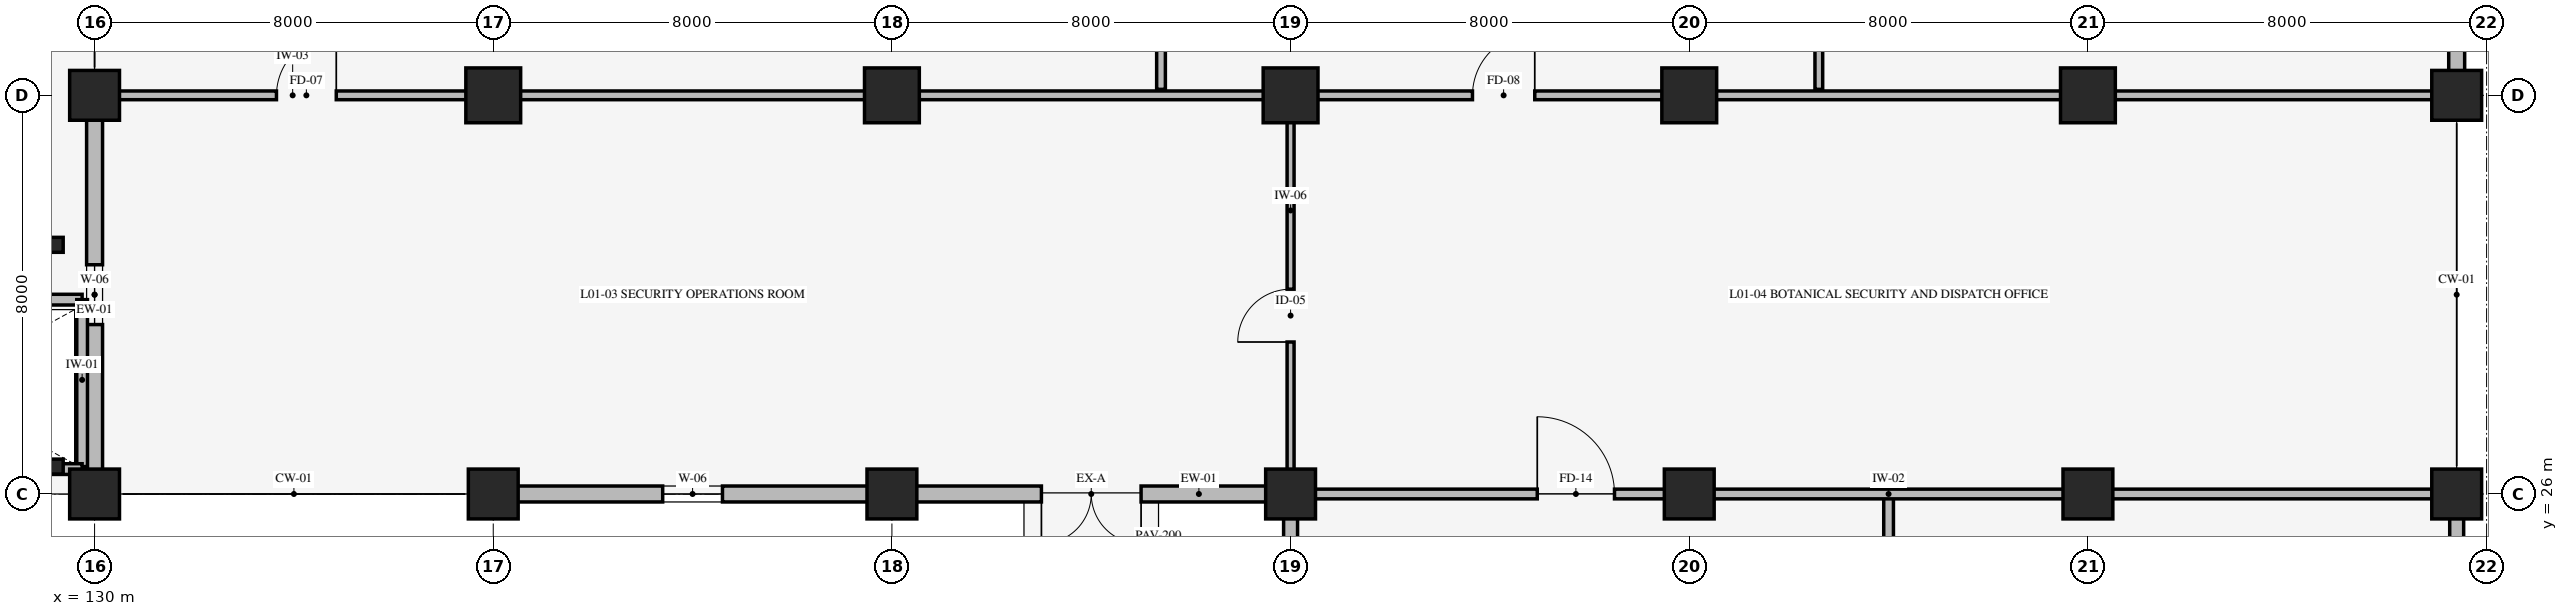
"""IFC4 building model, lengths in metres.
Left out: names, types, materials, properties, quantities, classifications, styles, units other than length and angle.
Written with IfcOpenShell. Run it as: python <this file> out.ifc"""

import sys

from ifc_helpers import new_model, si_unit, direction, frame, frame_2d, origin, origin_2d, place, context, subcontext, project, spatial, rectangle, hollow_rectangle, extrude, element, fill, save


model = new_model("IFC4")
c1 = context("Model", 3, precision=1e-05, world=origin(), true_north=direction((0.0, 1.0)))
c2 = subcontext(c1, "Body", "Model", "MODEL_VIEW")
j1 = project(units=[si_unit("LENGTHUNIT", "METRE"), si_unit("PLANEANGLEUNIT", "RADIAN")], contexts=[c1])
p1 = place(None, origin())
s1 = spatial("IfcSite", under=j1, at=p1, CompositionType="ELEMENT")
p2 = place(p1, origin())
s2 = spatial("IfcBuilding", under=s1, at=p2, CompositionType="ELEMENT")
p3 = place(p2, origin())
s3 = spatial("IfcBuildingStorey", under=s2, at=p3, CompositionType="ELEMENT", Elevation=0.0)
for number, where, z_axis, x_axis in (
    (1, (130.0, 26.0, 0.0), (0.0, 0.0, 1.0), (1.0, 0.0, 0.0)),
    (2, (130.0, 34.0, 0.0), (0.0, 0.0, 1.0), (1.0, 0.0, 0.0)),
    (3, (138.0, 26.0, 0.0), (0.0, 0.0, 1.0), (1.0, 0.0, 0.0)),
):
    element("IfcColumn", number, at=place(p3, frame(where, z_axis=z_axis, x_axis=x_axis)), inside=s3, PredefinedType="COLUMN", context=c2, shape_type="SweptSolid", body=[
        extrude(rectangle(XDim=1.0, YDim=1.0, at=origin_2d()), origin(), (0.0, 0.0, 1.0), 5.4),
    ])
p4 = place(p3, frame((138.0, 34.0, 0.0), z_axis=(0.0, 0.0, 1.0), x_axis=(1.0, 0.0, 0.0)))
e4 = element("IfcColumn", 4, at=p4, inside=s3, PredefinedType="COLUMN", context=c2, shape_type="SweptSolid", body=[
    extrude(rectangle(XDim=1.1, YDim=1.1, at=origin_2d()), origin(), (0.0, 0.0, 1.0), 5.4),
])
p5 = place(p3, frame((146.0, 26.0, 0.0), z_axis=(0.0, 0.0, 1.0), x_axis=(1.0, 0.0, 0.0)))
e5 = element("IfcColumn", 5, at=p5, inside=s3, PredefinedType="COLUMN", context=c2, shape_type="SweptSolid", body=[
    extrude(rectangle(XDim=1.0, YDim=1.0, at=origin_2d()), origin(), (0.0, 0.0, 1.0), 5.4),
])
p6 = place(p3, frame((146.0, 34.0, 0.0), z_axis=(0.0, 0.0, 1.0), x_axis=(1.0, 0.0, 0.0)))
e6 = element("IfcColumn", 6, at=p6, inside=s3, PredefinedType="COLUMN", context=c2, shape_type="SweptSolid", body=[
    extrude(rectangle(XDim=1.1, YDim=1.1, at=origin_2d()), origin(), (0.0, 0.0, 1.0), 5.4),
])
p7 = place(p3, frame((154.0, 26.0, 0.0), z_axis=(0.0, 0.0, 1.0), x_axis=(1.0, 0.0, 0.0)))
e7 = element("IfcColumn", 7, at=p7, inside=s3, PredefinedType="COLUMN", context=c2, shape_type="SweptSolid", body=[
    extrude(rectangle(XDim=1.0, YDim=1.0, at=origin_2d()), origin(), (0.0, 0.0, 1.0), 5.4),
])
p8 = place(p3, frame((154.0, 34.0, 0.0), z_axis=(0.0, 0.0, 1.0), x_axis=(1.0, 0.0, 0.0)))
e8 = element("IfcColumn", 8, at=p8, inside=s3, PredefinedType="COLUMN", context=c2, shape_type="SweptSolid", body=[
    extrude(rectangle(XDim=1.1, YDim=1.1, at=origin_2d()), origin(), (0.0, 0.0, 1.0), 5.4),
])
p9 = place(p3, frame((162.0, 26.0, 0.0), z_axis=(0.0, 0.0, 1.0), x_axis=(1.0, 0.0, 0.0)))
e9 = element("IfcColumn", 9, at=p9, inside=s3, PredefinedType="COLUMN", context=c2, shape_type="SweptSolid", body=[
    extrude(rectangle(XDim=1.0, YDim=1.0, at=origin_2d()), origin(), (0.0, 0.0, 1.0), 5.4),
])
p10 = place(p3, frame((162.0, 34.0, 0.0), z_axis=(0.0, 0.0, 1.0), x_axis=(1.0, 0.0, 0.0)))
e10 = element("IfcColumn", 10, at=p10, inside=s3, PredefinedType="COLUMN", context=c2, shape_type="SweptSolid", body=[
    extrude(rectangle(XDim=1.1, YDim=1.1, at=origin_2d()), origin(), (0.0, 0.0, 1.0), 5.4),
])
p11 = place(p3, frame((170.0, 26.0, 0.0), z_axis=(0.0, 0.0, 1.0), x_axis=(1.0, 0.0, 0.0)))
e11 = element("IfcColumn", 11, at=p11, inside=s3, PredefinedType="COLUMN", context=c2, shape_type="SweptSolid", body=[
    extrude(rectangle(XDim=1.0, YDim=1.0, at=origin_2d()), origin(), (0.0, 0.0, 1.0), 5.4),
])
p12 = place(p3, frame((170.0, 34.0, 0.0), z_axis=(0.0, 0.0, 1.0), x_axis=(1.0, 0.0, 0.0)))
e12 = element("IfcColumn", 12, at=p12, inside=s3, PredefinedType="COLUMN", context=c2, shape_type="SweptSolid", body=[
    extrude(rectangle(XDim=1.1, YDim=1.1, at=origin_2d()), origin(), (0.0, 0.0, 1.0), 5.4),
])
for number, where, z_axis, x_axis in (
    (13, (177.4, 26.0, 0.0), (0.0, 0.0, 1.0), (1.0, 0.0, 0.0)),
    (14, (177.4, 34.0, 0.0), (0.0, 0.0, 1.0), (1.0, 0.0, 0.0)),
):
    element("IfcColumn", number, at=place(p3, frame(where, z_axis=z_axis, x_axis=x_axis)), inside=s3, PredefinedType="COLUMN", context=c2, shape_type="SweptSolid", body=[
        extrude(rectangle(XDim=1.0, YDim=1.0, at=origin_2d()), origin(), (0.0, 0.0, 1.0), 5.4),
    ])
for number, where, z_axis, x_axis in (
    (15, (129.22, 26.55, 0.0), (0.0, 0.0, 1.0), (1.0, 0.0, 0.0)),
    (16, (129.22, 31.0, 0.0), (0.0, 0.0, 1.0), (1.0, 0.0, 0.0)),
):
    element("IfcColumn", number, at=place(p3, frame(where, z_axis=z_axis, x_axis=x_axis)), inside=s3, PredefinedType="COLUMN", context=c2, shape_type="SweptSolid", body=[
        extrude(hollow_rectangle(XDim=0.3, YDim=0.3, WallThickness=0.01, at=origin_2d()), origin(), (0.0, 0.0, 1.0), 4.34),
    ])
p13 = place(p3, frame((154.0, 26.0, 0.0), z_axis=(0.0, 0.0, 1.0), x_axis=(-1.0, 0.0, 0.0)))
e17 = element("IfcWall", 17, at=p13, inside=s3, PredefinedType="STANDARD", context=c2, shape_type="SweptSolid", body=[
    extrude(rectangle(XDim=8.0, YDim=0.32, at=frame_2d((4.0, 0.0))), origin(), (0.0, 0.0, 1.0), 4.2),
])
p14 = place(p13, frame((3.0, 0.0, 0.0)))
e18 = element("IfcOpeningElement", 18, at=p14, cuts=e17, PredefinedType="OPENING", context=c2, shape_type="SweptSolid", body=[
    extrude(rectangle(XDim=2.0, YDim=2.4, at=frame_2d((1.0, 1.2))), frame((0.0, 0.17, 0.0), z_axis=(0.0, -1.0, 0.0), x_axis=(1.0, 0.0, 0.0)), (0.0, 0.0, 1.0), 0.34),
])
p15 = place(p3, frame((146.0, 26.0, 0.0), z_axis=(0.0, 0.0, 1.0), x_axis=(-1.0, 0.0, 0.0)))
e19 = element("IfcWall", 19, at=p15, inside=s3, PredefinedType="STANDARD", context=c2, shape_type="SweptSolid", body=[
    extrude(rectangle(XDim=8.0, YDim=0.32, at=frame_2d((4.0, 0.0))), origin(), (0.0, 0.0, 1.0), 4.2),
])
p16 = place(p15, frame((3.4, 0.0, 0.85)))
e20 = element("IfcOpeningElement", 20, at=p16, cuts=e19, PredefinedType="OPENING", context=c2, shape_type="SweptSolid", body=[
    extrude(rectangle(XDim=1.2, YDim=1.2, at=frame_2d((0.6, 0.6))), frame((0.0, 0.17, 0.0), z_axis=(0.0, -1.0, 0.0), x_axis=(1.0, 0.0, 0.0)), (0.0, 0.0, 1.0), 0.34),
])
p17 = place(p3, frame((130.0, 26.0, 0.0), z_axis=(0.0, 0.0, 1.0), x_axis=(0.0, 1.0, 0.0)))
e21 = element("IfcWall", 21, at=p17, inside=s3, PredefinedType="STANDARD", context=c2, shape_type="SweptSolid", body=[
    extrude(rectangle(XDim=8.0, YDim=0.32, at=frame_2d((4.0, 0.0))), origin(), (0.0, 0.0, 1.0), 4.15),
])
p18 = place(p17, frame((3.4, 0.0, 0.85)))
e22 = element("IfcOpeningElement", 22, at=p18, cuts=e21, PredefinedType="OPENING", context=c2, shape_type="SweptSolid", body=[
    extrude(rectangle(XDim=1.2, YDim=1.2, at=frame_2d((0.6, 0.6))), frame((0.0, 0.17, 0.0), z_axis=(0.0, -1.0, 0.0), x_axis=(1.0, 0.0, 0.0)), (0.0, 0.0, 1.0), 0.34),
])
p19 = place(p3, frame((177.4, 42.0, 0.0), z_axis=(0.0, 0.0, 1.0), x_axis=(0.0, -1.0, 0.0)))
e23 = element("IfcWall", 23, at=p19, inside=s3, PredefinedType="STANDARD", context=c2, shape_type="SweptSolid", body=[
    extrude(rectangle(XDim=8.0, YDim=0.32, at=frame_2d((4.0, 0.0))), origin(), (0.0, 0.0, 1.0), 4.15),
])
p20 = place(p19, frame((3.4, 0.0, 0.85)))
e24 = element("IfcOpeningElement", 24, at=p20, cuts=e23, PredefinedType="OPENING", context=c2, shape_type="SweptSolid", body=[
    extrude(rectangle(XDim=1.2, YDim=1.2, at=frame_2d((0.6, 0.6))), frame((0.0, 0.17, 0.0), z_axis=(0.0, -1.0, 0.0), x_axis=(1.0, 0.0, 0.0)), (0.0, 0.0, 1.0), 0.34),
])
p21 = place(p3, frame((177.4, 26.0, 0.0), z_axis=(0.0, 0.0, 1.0), x_axis=(0.0, -1.0, 0.0)))
e25 = element("IfcWall", 25, at=p21, inside=s3, PredefinedType="STANDARD", context=c2, shape_type="SweptSolid", body=[
    extrude(rectangle(XDim=15.4, YDim=0.28, at=frame_2d((7.7, 0.0))), origin(), (0.0, 0.0, 1.0), 5.7),
])
p22 = place(p21, frame((1.6, 0.0, 0.0)))
e26 = element("IfcOpeningElement", 26, at=p22, cuts=e25, PredefinedType="OPENING", context=c2, shape_type="SweptSolid", body=[
    extrude(rectangle(XDim=4.0, YDim=3.2, at=frame_2d((2.0, 1.6))), frame((0.0, 0.15, 0.0), z_axis=(0.0, -1.0, 0.0), x_axis=(1.0, 0.0, 0.0)), (0.0, 0.0, 1.0), 0.3),
])
p23 = place(p3, frame((154.0, 10.6, 0.0), z_axis=(0.0, 0.0, 1.0), x_axis=(0.0, 1.0, 0.0)))
e27 = element("IfcWall", 27, at=p23, inside=s3, PredefinedType="STANDARD", context=c2, shape_type="SweptSolid", body=[
    extrude(rectangle(XDim=15.4, YDim=0.28, at=frame_2d((7.7, 0.0))), origin(), (0.0, 0.0, 1.0), 5.7),
])
p24 = place(p23, frame((2.2, 0.0, 0.9)))
e28 = element("IfcOpeningElement", 28, at=p24, cuts=e27, PredefinedType="OPENING", context=c2, shape_type="SweptSolid", body=[
    extrude(rectangle(XDim=2.4, YDim=1.8, at=frame_2d((1.2, 0.9))), frame((0.0, 0.15, 0.0), z_axis=(0.0, -1.0, 0.0), x_axis=(1.0, 0.0, 0.0)), (0.0, 0.0, 1.0), 0.3),
])
p25 = place(p3, frame((122.3, 29.9, 0.0), z_axis=(0.0, 0.0, 1.0), x_axis=(1.0, 0.0, 0.0)))
e29 = element("IfcWall", 29, at=p25, inside=s3, PredefinedType="STANDARD", context=c2, shape_type="SweptSolid", body=[
    extrude(rectangle(XDim=7.45, YDim=0.215, at=frame_2d((3.725, 0.0))), origin(), (0.0, 0.0, 1.0), 5.1),
])
p26 = place(p25, frame((0.35, 0.0, 0.0)))
e30 = element("IfcOpeningElement", 30, at=p26, cuts=e29, PredefinedType="OPENING", context=c2, shape_type="SweptSolid", body=[
    extrude(rectangle(XDim=1.6, YDim=2.3, at=frame_2d((0.8, 1.15))), frame((0.0, 0.118, 0.0), z_axis=(0.0, -1.0, 0.0), x_axis=(1.0, 0.0, 0.0)), (0.0, 0.0, 1.0), 0.235),
])
p27 = place(p3, frame((129.75, 26.55, 0.0), z_axis=(0.0, 0.0, 1.0), x_axis=(0.0, 1.0, 0.0)))
e31 = element("IfcWall", 31, at=p27, inside=s3, PredefinedType="STANDARD", context=c2, shape_type="SweptSolid", body=[
    extrude(rectangle(XDim=3.35, YDim=0.215, at=frame_2d((1.675, 0.0))), origin(), (0.0, 0.0, 1.0), 4.15),
])
p28 = place(p3, frame((129.75, 26.5, 0.0), z_axis=(0.0, 0.0, 1.0), x_axis=(-1.0, 0.0, 0.0)))
e32 = element("IfcWall", 32, at=p28, inside=s3, PredefinedType="STANDARD", context=c2, shape_type="SweptSolid", body=[
    extrude(rectangle(XDim=7.45, YDim=0.215, at=frame_2d((3.725, 0.0))), origin(), (0.0, 0.0, 1.0), 4.28),
])
p29 = place(p3, frame((166.0, 10.72, 0.0), z_axis=(0.0, 0.0, 1.0), x_axis=(0.0, 1.0, 0.0)))
e33 = element("IfcWall", 33, at=p29, inside=s3, PredefinedType="STANDARD", context=c2, shape_type="SweptSolid", body=[
    extrude(rectangle(XDim=15.28, YDim=0.195, at=frame_2d((7.64, 0.0))), origin(), (0.0, 0.0, 1.0), 5.1),
])
p30 = place(p29, frame((6.5, 0.0, 0.0)))
e34 = element("IfcOpeningElement", 34, at=p30, cuts=e33, PredefinedType="OPENING", context=c2, shape_type="SweptSolid", body=[
    extrude(rectangle(XDim=1.25, YDim=2.15, at=frame_2d((0.625, 1.075))), frame((0.0, 0.107, 0.0), z_axis=(0.0, -1.0, 0.0), x_axis=(1.0, 0.0, 0.0)), (0.0, 0.0, 1.0), 0.215),
])
p31 = place(p3, frame((154.35, 26.0, 0.0), z_axis=(0.0, 0.0, 1.0), x_axis=(1.0, 0.0, 0.0)))
e35 = element("IfcWall", 35, at=p31, inside=s3, PredefinedType="STANDARD", context=c2, shape_type="SweptSolid", body=[
    extrude(rectangle(XDim=22.93, YDim=0.195, at=frame_2d((11.465, 0.0))), origin(), (0.0, 0.0, 1.0), 4.2),
])
p32 = place(p31, frame((4.6, 0.0, 0.0)))
e36 = element("IfcOpeningElement", 36, at=p32, cuts=e35, PredefinedType="OPENING", context=c2, shape_type="SweptSolid", body=[
    extrude(rectangle(XDim=1.55, YDim=2.25, at=frame_2d((0.775, 1.125))), frame((0.0, 0.107, 0.0), z_axis=(0.0, -1.0, 0.0), x_axis=(1.0, 0.0, 0.0)), (0.0, 0.0, 1.0), 0.215),
])
p33 = place(p3, frame((151.4, 34.12, 0.0), z_axis=(0.0, 0.0, 1.0), x_axis=(0.0, 1.0, 0.0)))
e37 = element("IfcWall", 37, at=p33, inside=s3, PredefinedType="STANDARD", context=c2, shape_type="SweptSolid", body=[
    extrude(rectangle(XDim=19.76, YDim=0.175, at=frame_2d((9.88, 0.0))), origin(), (0.0, 0.0, 1.0), 5.1),
])
p34 = place(p33, frame((9.38, 0.0, 0.0)))
e38 = element("IfcOpeningElement", 38, at=p34, cuts=e37, PredefinedType="OPENING", context=c2, shape_type="SweptSolid", body=[
    extrude(rectangle(XDim=1.0, YDim=2.1, at=frame_2d((0.5, 1.05))), frame((0.0, 0.098, 0.0), z_axis=(0.0, -1.0, 0.0), x_axis=(1.0, 0.0, 0.0)), (0.0, 0.0, 1.0), 0.195),
])
p35 = place(p3, frame((164.6, 34.12, 0.0), z_axis=(0.0, 0.0, 1.0), x_axis=(0.0, 1.0, 0.0)))
e39 = element("IfcWall", 39, at=p35, inside=s3, PredefinedType="STANDARD", context=c2, shape_type="SweptSolid", body=[
    extrude(rectangle(XDim=15.8, YDim=0.155, at=frame_2d((7.9, 0.0))), origin(), (0.0, 0.0, 1.0), 5.1),
])
p36 = place(p35, frame((7.375, 0.0, 0.0)))
e40 = element("IfcOpeningElement", 40, at=p36, cuts=e39, PredefinedType="OPENING", context=c2, shape_type="SweptSolid", body=[
    extrude(rectangle(XDim=1.05, YDim=2.1, at=frame_2d((0.525, 1.05))), frame((0.0, 0.087, 0.0), z_axis=(0.0, -1.0, 0.0), x_axis=(1.0, 0.0, 0.0)), (0.0, 0.0, 1.0), 0.175),
])
p37 = place(p3, frame((130.35, 34.0, 0.0), z_axis=(0.0, 0.0, 1.0), x_axis=(1.0, 0.0, 0.0)))
e41 = element("IfcWall", 41, at=p37, inside=s3, PredefinedType="STANDARD", context=c2, shape_type="SweptSolid", body=[
    extrude(rectangle(XDim=23.3, YDim=0.175, at=frame_2d((11.65, 0.0))), origin(), (0.0, 0.0, 1.0), 4.2),
])
p38 = place(p37, frame((3.3, 0.0, 0.0)))
e42 = element("IfcOpeningElement", 42, at=p38, cuts=e41, PredefinedType="OPENING", context=c2, shape_type="SweptSolid", body=[
    extrude(rectangle(XDim=1.2, YDim=2.1, at=frame_2d((0.6, 1.05))), frame((0.0, 0.098, 0.0), z_axis=(0.0, -1.0, 0.0), x_axis=(1.0, 0.0, 0.0)), (0.0, 0.0, 1.0), 0.195),
])
p39 = place(p3, frame((154.0, 26.05, 0.0), z_axis=(0.0, 0.0, 1.0), x_axis=(0.0, 1.0, 0.0)))
e43 = element("IfcWall", 43, at=p39, inside=s3, PredefinedType="STANDARD", context=c2, shape_type="SweptSolid", body=[
    extrude(rectangle(XDim=7.83, YDim=0.14, at=frame_2d((3.915, 0.0))), origin(), (0.0, 0.0, 1.0), 4.15),
])
p40 = place(p39, frame((3.0, 0.0, 0.0)))
e44 = element("IfcOpeningElement", 44, at=p40, cuts=e43, PredefinedType="OPENING", context=c2, shape_type="SweptSolid", body=[
    extrude(rectangle(XDim=1.06, YDim=2.12, at=frame_2d((0.53, 1.06))), frame((0.0, 0.08, 0.0), z_axis=(0.0, -1.0, 0.0), x_axis=(1.0, 0.0, 0.0)), (0.0, 0.0, 1.0), 0.16),
])
p41 = place(p3, frame((154.35, 34.0, 0.0), z_axis=(0.0, 0.0, 1.0), x_axis=(1.0, 0.0, 0.0)))
e45 = element("IfcWall", 45, at=p41, inside=s3, PredefinedType="STANDARD", context=c2, shape_type="SweptSolid", body=[
    extrude(rectangle(XDim=22.7, YDim=0.175, at=frame_2d((11.35, 0.0))), origin(), (0.0, 0.0, 1.0), 4.2),
])
p42 = place(p41, frame((3.3, 0.0, 0.0)))
e46 = element("IfcOpeningElement", 46, at=p42, cuts=e45, PredefinedType="OPENING", context=c2, shape_type="SweptSolid", body=[
    extrude(rectangle(XDim=1.25, YDim=2.15, at=frame_2d((0.625, 1.075))), frame((0.0, 0.098, 0.0), z_axis=(0.0, -1.0, 0.0), x_axis=(1.0, 0.0, 0.0)), (0.0, 0.0, 1.0), 0.195),
])
p43 = place(p14, origin())
e47 = element("IfcDoor", 47, at=p43, inside=s3, OperationType="DOUBLE_DOOR_SINGLE_SWING", PredefinedType="DOOR", context=c2, shape_type="SweptSolid", body=[
    extrude(rectangle(XDim=2.0, YDim=2.4, at=frame_2d((1.0, 1.2))), frame((0.0, 0.025, 0.0), z_axis=(0.0, -1.0, 0.0), x_axis=(1.0, 0.0, 0.0)), (0.0, 0.0, 1.0), 0.05),
])
fill(e18, e47)
p44 = place(p16, origin())
e48 = element("IfcWindow", 48, at=p44, inside=s3, PartitioningType="SINGLE_PANEL", PredefinedType="WINDOW", context=c2, shape_type="SweptSolid", body=[
    extrude(rectangle(XDim=1.2, YDim=1.2, at=frame_2d((0.6, 0.6))), frame((0.0, 0.03, 0.0), z_axis=(0.0, -1.0, 0.0), x_axis=(1.0, 0.0, 0.0)), (0.0, 0.0, 1.0), 0.06),
])
fill(e20, e48)
p45 = place(p18, origin())
e49 = element("IfcWindow", 49, at=p45, inside=s3, PartitioningType="SINGLE_PANEL", PredefinedType="WINDOW", context=c2, shape_type="SweptSolid", body=[
    extrude(rectangle(XDim=1.2, YDim=1.2, at=frame_2d((0.6, 0.6))), frame((0.0, 0.03, 0.0), z_axis=(0.0, -1.0, 0.0), x_axis=(1.0, 0.0, 0.0)), (0.0, 0.0, 1.0), 0.06),
])
fill(e22, e49)
p46 = place(p32, origin())
e50 = element("IfcDoor", 50, at=p46, inside=s3, OperationType="SINGLE_SWING_LEFT", PredefinedType="DOOR", context=c2, shape_type="SweptSolid", body=[
    extrude(rectangle(XDim=1.55, YDim=2.25, at=frame_2d((0.775, 1.125))), frame((0.0, 0.025, 0.0), z_axis=(0.0, -1.0, 0.0), x_axis=(1.0, 0.0, 0.0)), (0.0, 0.0, 1.0), 0.05),
])
fill(e36, e50)
p47 = place(p38, origin())
e51 = element("IfcDoor", 51, at=p47, inside=s3, OperationType="SINGLE_SWING_RIGHT", PredefinedType="DOOR", context=c2, shape_type="SweptSolid", body=[
    extrude(rectangle(XDim=1.2, YDim=2.1, at=frame_2d((0.6, 1.05))), frame((0.0, 0.025, 0.0), z_axis=(0.0, -1.0, 0.0), x_axis=(1.0, 0.0, 0.0)), (0.0, 0.0, 1.0), 0.05),
])
fill(e42, e51)
p48 = place(p40, origin())
e52 = element("IfcDoor", 52, at=p48, inside=s3, OperationType="SINGLE_SWING_LEFT", PredefinedType="DOOR", context=c2, shape_type="SweptSolid", body=[
    extrude(rectangle(XDim=1.06, YDim=2.12, at=frame_2d((0.53, 1.06))), frame((0.0, 0.025, 0.0), z_axis=(0.0, -1.0, 0.0), x_axis=(1.0, 0.0, 0.0)), (0.0, 0.0, 1.0), 0.05),
])
fill(e44, e52)
p49 = place(p42, origin())
e53 = element("IfcDoor", 53, at=p49, inside=s3, OperationType="SINGLE_SWING_RIGHT", PredefinedType="DOOR", context=c2, shape_type="SweptSolid", body=[
    extrude(rectangle(XDim=1.25, YDim=2.15, at=frame_2d((0.625, 1.075))), frame((0.0, 0.025, 0.0), z_axis=(0.0, -1.0, 0.0), x_axis=(1.0, 0.0, 0.0)), (0.0, 0.0, 1.0), 0.05),
])
fill(e46, e53)
save(model, sys.argv[1])
